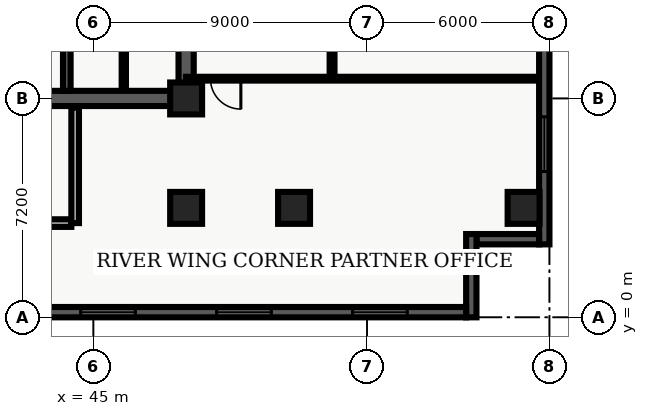
"""IFC4 building model, lengths in metres.
Left out: names, types, materials, properties, quantities, classifications, styles, units other than length and angle.
Written with IfcOpenShell. Run it as: python <this file> out.ifc"""

import sys

from ifc_helpers import new_model, entity, si_unit, converted_unit, direction, frame, origin_with_axes, origin_2d_with_axis, place, context, subcontext, project, spatial, polyline, rectangle, outline, extrude, element, fill, save


model = new_model("IFC4")
c1 = context("Model", 3, precision=1e-05, world=origin_with_axes(), true_north=direction((0.0, 1.0)))
c2 = subcontext(c1, "Body", "Model", "MODEL_VIEW")
j1 = project(units=[si_unit("LENGTHUNIT", "METRE"), converted_unit("PLANEANGLEUNIT", "DEGREE", entity("IfcPlaneAngleMeasure", 0.017), si_unit("PLANEANGLEUNIT", "RADIAN"), dimensions=[0, 0, 0, 0, 0, 0, 0])], contexts=[c1])
p1 = place(None, origin_with_axes())
s1 = spatial("IfcSite", under=j1, at=p1, CompositionType="ELEMENT")
p2 = place(p1, origin_with_axes())
s2 = spatial("IfcBuilding", under=s1, at=p2, CompositionType="ELEMENT")
p3 = place(p2, frame((0.0, 0.0, 140.7), z_axis=(0.0, 0.0, 1.0), x_axis=(1.0, 0.0, 0.0)))
s3 = spatial("IfcBuildingStorey", under=s2, at=p3, CompositionType="ELEMENT", Elevation=140.7)
p4 = place(p3, frame((40.2, 7.2, 0.0), z_axis=(0.0, 0.0, 1.0), x_axis=(1.0, 0.0, 0.0)))
e1 = element("IfcWall", 1, at=p4, inside=s3, PredefinedType="SHEAR", context=c2, shape_type="SweptSolid", body=[
    extrude(outline(polyline([(0.0, -0.25), (7.85, -0.25), (7.85, 0.25), (0.0, 0.25), (0.0, -0.25)])), origin_with_axes(), (0.0, 0.0, 1.0), 3.66),
])
p5 = place(p4, frame((2.175, 0.0, 0.0), z_axis=(0.0, 0.0, 1.0), x_axis=(1.0, 0.0, 0.0)))
e2 = element("IfcOpeningElement", 2, at=p5, cuts=e1, PredefinedType="OPENING", context=c2, shape_type="SweptSolid", body=[
    extrude(rectangle(XDim=1.05, YDim=0.52, at=origin_2d_with_axis()), origin_with_axes(), (0.0, 0.0, 1.0), 2.15),
])
p6 = place(p3, frame((48.05, 7.2, 0.0), z_axis=(0.0, 0.0, 1.0), x_axis=(0.0, 1.0, 0.0)))
e3 = element("IfcWall", 3, at=p6, inside=s3, PredefinedType="SHEAR", context=c2, shape_type="SweptSolid", body=[
    extrude(outline(polyline([(0.0, -0.25), (15.6, -0.25), (15.6, 0.25), (0.0, 0.25), (0.0, -0.25)])), origin_with_axes(), (0.0, 0.0, 1.0), 3.66),
])
p7 = place(p6, frame((5.975, 0.0, 0.0), z_axis=(0.0, 0.0, 1.0), x_axis=(1.0, 0.0, 0.0)))
e4 = element("IfcOpeningElement", 4, at=p7, cuts=e3, PredefinedType="OPENING", context=c2, shape_type="SweptSolid", body=[
    extrude(rectangle(XDim=1.05, YDim=0.52, at=origin_2d_with_axis()), origin_with_axes(), (0.0, 0.0, 1.0), 2.15),
])
p8 = place(p6, frame((2.725, 0.0, 0.0), z_axis=(0.0, 0.0, 1.0), x_axis=(1.0, 0.0, 0.0)))
e5 = element("IfcOpeningElement", 5, at=p8, cuts=e3, PredefinedType="OPENING", context=c2, shape_type="SweptSolid", body=[
    extrude(rectangle(XDim=0.95, YDim=0.52, at=origin_2d_with_axis()), origin_with_axes(), (0.0, 0.0, 1.0), 2.15),
])
p9 = place(p3, frame((44.125, 7.45, 0.0), z_axis=(0.0, 0.0, 1.0), x_axis=(0.0, 1.0, 0.0)))
e6 = element("IfcWall", 6, at=p9, inside=s3, PredefinedType="SHEAR", context=c2, shape_type="SweptSolid", body=[
    extrude(outline(polyline([(0.0, -0.125), (15.1, -0.125), (15.1, 0.125), (0.0, 0.125), (0.0, -0.125)])), origin_with_axes(), (0.0, 0.0, 1.0), 3.66),
])
p10 = place(p3, frame((40.325, 3.1, 0.0), z_axis=(0.0, 0.0, 1.0), x_axis=(1.0, 0.0, 0.0)))
e7 = element("IfcWall", 7, at=p10, inside=s3, PredefinedType="SOLIDWALL", context=c2, shape_type="SweptSolid", body=[
    extrude(outline(polyline([(0.0, -0.125), (3.95, -0.125), (3.95, 0.125), (0.0, 0.125), (0.0, -0.125)])), origin_with_axes(), (0.0, 0.0, 1.0), 2.7),
])
p11 = place(p3, frame((44.4, 3.1, 0.0), z_axis=(0.0, 0.0, 1.0), x_axis=(0.0, 1.0, 0.0)))
e8 = element("IfcWall", 8, at=p11, inside=s3, PredefinedType="SOLIDWALL", context=c2, shape_type="SweptSolid", body=[
    extrude(outline(polyline([(0.0, -0.125), (3.8, -0.125), (3.8, 0.125), (0.0, 0.125), (0.0, -0.125)])), origin_with_axes(), (0.0, 0.0, 1.0), 2.7),
])
for number, where, z_axis, x_axis in (
    (9, (48.05, 3.6, 0.0), (0.0, 0.0, 1.0), (1.0, 0.0, 0.0)),
    (10, (48.05, 7.2, 0.0), (0.0, 0.0, 1.0), (1.0, 0.0, 0.0)),
    (11, (51.6, 3.6, 0.0), (0.0, 0.0, 1.0), (1.0, 0.0, 0.0)),
    (12, (59.15, 3.6, 0.0), (0.0, 0.0, 1.0), (1.0, 0.0, 0.0)),
):
    element("IfcColumn", number, at=place(p3, frame(where, z_axis=z_axis, x_axis=x_axis)), inside=s3, PredefinedType="COLUMN", context=c2, shape_type="SweptSolid", body=[
        extrude(rectangle(XDim=1.05, YDim=1.05, at=origin_2d_with_axis()), origin_with_axes(), (0.0, 0.0, 1.0), 3.9),
    ])
p12 = place(p3, frame((46.0, 7.5, 0.0), z_axis=(0.0, 0.0, 1.0), x_axis=(0.0, 1.0, 0.0)))
e13 = element("IfcWall", 13, at=p12, inside=s3, PredefinedType="PARTITIONING", context=c2, shape_type="SweptSolid", body=[
    extrude(outline(polyline([(0.0, -0.07), (4.08, -0.07), (4.08, 0.07), (0.0, 0.07), (0.0, -0.07)])), origin_with_axes(), (0.0, 0.0, 1.0), 2.7),
])
p13 = place(p12, frame((2.0, 0.0, 0.0), z_axis=(0.0, 0.0, 1.0), x_axis=(1.0, 0.0, 0.0)))
e14 = element("IfcOpeningElement", 14, at=p13, cuts=e13, PredefinedType="OPENING", context=c2, shape_type="SweptSolid", body=[
    extrude(rectangle(XDim=0.9, YDim=0.16, at=origin_2d_with_axis()), origin_with_axes(), (0.0, 0.0, 1.0), 2.15),
])
p14 = place(p3, frame((52.85, 7.85, 0.0), z_axis=(0.0, 0.0, 1.0), x_axis=(0.0, 1.0, 0.0)))
e15 = element("IfcWall", 15, at=p14, inside=s3, PredefinedType="PARTITIONING", context=c2, shape_type="SweptSolid", body=[
    extrude(outline(polyline([(0.0, -0.08), (18.8, -0.08), (18.8, 0.08), (0.0, 0.08), (0.0, -0.08)])), origin_with_axes(), (0.0, 0.0, 1.0), 2.7),
])
p15 = place(p14, frame((4.133, 0.0, 0.0), z_axis=(0.0, 0.0, 1.0), x_axis=(1.0, 0.0, 0.0)))
e16 = element("IfcOpeningElement", 16, at=p15, cuts=e15, PredefinedType="OPENING", context=c2, shape_type="SweptSolid", body=[
    extrude(rectangle(XDim=1.0, YDim=0.18, at=origin_2d_with_axis()), origin_with_axes(), (0.0, 0.0, 1.0), 2.15),
])
p16 = place(p14, frame((13.473, 0.0, 0.0), z_axis=(0.0, 0.0, 1.0), x_axis=(1.0, 0.0, 0.0)))
e17 = element("IfcOpeningElement", 17, at=p16, cuts=e15, PredefinedType="OPENING", context=c2, shape_type="SweptSolid", body=[
    extrude(rectangle(XDim=1.0, YDim=0.18, at=origin_2d_with_axis()), origin_with_axes(), (0.0, 0.0, 1.0), 2.15),
])
p17 = place(p3, frame((59.665, 7.85, 0.0), z_axis=(0.0, 0.0, 1.0), x_axis=(-1.0, 0.0, 0.0)))
e18 = element("IfcWall", 18, at=p17, inside=s3, PredefinedType="PARTITIONING", context=c2, shape_type="SweptSolid", body=[
    extrude(outline(polyline([(0.0, -0.062), (11.615, -0.062), (11.615, 0.062), (0.0, 0.062), (0.0, -0.062)])), origin_with_axes(), (0.0, 0.0, 1.0), 2.7),
])
p18 = place(p17, frame((10.315, 0.0, 0.0), z_axis=(0.0, 0.0, 1.0), x_axis=(1.0, 0.0, 0.0)))
e19 = element("IfcOpeningElement", 19, at=p18, cuts=e18, PredefinedType="OPENING", context=c2, shape_type="SweptSolid", body=[
    extrude(rectangle(XDim=1.0, YDim=0.145, at=origin_2d_with_axis()), origin_with_axes(), (0.0, 0.0, 1.0), 2.15),
])
p19 = place(p3, frame((59.83, 26.06, 0.0), z_axis=(0.0, 0.0, 1.0), x_axis=(0.0, -1.0, 0.0)))
e20 = element("IfcWall", 20, at=p19, inside=s3, PredefinedType="SOLIDWALL", context=c2, shape_type="SweptSolid", body=[
    extrude(outline(polyline([(0.0, -0.17), (23.66, -0.17), (23.66, 0.17), (0.0, 0.17), (0.0, -0.17)])), origin_with_axes(), (0.0, 0.0, 1.0), 3.66),
])
p20 = place(p19, frame((3.696, 0.0, 0.45), z_axis=(0.0, 0.0, 1.0), x_axis=(1.0, 0.0, 0.0)))
e21 = element("IfcOpeningElement", 21, at=p20, cuts=e20, PredefinedType="OPENING", context=c2, shape_type="SweptSolid", body=[
    extrude(rectangle(XDim=1.8, YDim=0.36, at=origin_2d_with_axis()), origin_with_axes(), (0.0, 0.0, 1.0), 2.1),
])
p21 = place(p19, frame((11.83, 0.0, 0.45), z_axis=(0.0, 0.0, 1.0), x_axis=(1.0, 0.0, 0.0)))
e22 = element("IfcOpeningElement", 22, at=p21, cuts=e20, PredefinedType="OPENING", context=c2, shape_type="SweptSolid", body=[
    extrude(rectangle(XDim=1.8, YDim=0.36, at=origin_2d_with_axis()), origin_with_axes(), (0.0, 0.0, 1.0), 2.1),
])
p22 = place(p19, frame((20.364, 0.0, 0.45), z_axis=(0.0, 0.0, 1.0), x_axis=(1.0, 0.0, 0.0)))
e23 = element("IfcOpeningElement", 23, at=p22, cuts=e20, PredefinedType="OPENING", context=c2, shape_type="SweptSolid", body=[
    extrude(rectangle(XDim=1.8, YDim=0.36, at=origin_2d_with_axis()), origin_with_axes(), (0.0, 0.0, 1.0), 2.1),
])
p23 = place(p3, frame((59.66, 2.57, 0.0), z_axis=(0.0, 0.0, 1.0), x_axis=(-1.0, 0.0, 0.0)))
e24 = element("IfcWall", 24, at=p23, inside=s3, PredefinedType="SOLIDWALL", context=c2, shape_type="SweptSolid", body=[
    extrude(outline(polyline([(0.0, -0.17), (2.06, -0.17), (2.06, 0.17), (0.0, 0.17), (0.0, -0.17)])), origin_with_axes(), (0.0, 0.0, 1.0), 3.66),
])
p24 = place(p3, frame((57.43, 2.74, 0.0), z_axis=(0.0, 0.0, 1.0), x_axis=(0.0, -1.0, 0.0)))
e25 = element("IfcWall", 25, at=p24, inside=s3, PredefinedType="SOLIDWALL", context=c2, shape_type="SweptSolid", body=[
    extrude(outline(polyline([(0.0, -0.17), (2.74, -0.17), (2.74, 0.17), (0.0, 0.17), (0.0, -0.17)])), origin_with_axes(), (0.0, 0.0, 1.0), 3.66),
])
p25 = place(p3, frame((57.26, 0.17, 0.0), z_axis=(0.0, 0.0, 1.0), x_axis=(-1.0, 0.0, 0.0)))
e26 = element("IfcWall", 26, at=p25, inside=s3, PredefinedType="SOLIDWALL", context=c2, shape_type="SweptSolid", body=[
    extrude(outline(polyline([(0.0, -0.17), (54.86, -0.17), (54.86, 0.17), (0.0, 0.17), (0.0, -0.17)])), origin_with_axes(), (0.0, 0.0, 1.0), 3.66),
])
p26 = place(p25, frame((2.836, 0.0, 0.45), z_axis=(0.0, 0.0, 1.0), x_axis=(1.0, 0.0, 0.0)))
e27 = element("IfcOpeningElement", 27, at=p26, cuts=e26, PredefinedType="OPENING", context=c2, shape_type="SweptSolid", body=[
    extrude(rectangle(XDim=1.8, YDim=0.36, at=origin_2d_with_axis()), origin_with_axes(), (0.0, 0.0, 1.0), 2.1),
])
p27 = place(p25, frame((7.307, 0.0, 0.45), z_axis=(0.0, 0.0, 1.0), x_axis=(1.0, 0.0, 0.0)))
e28 = element("IfcOpeningElement", 28, at=p27, cuts=e26, PredefinedType="OPENING", context=c2, shape_type="SweptSolid", body=[
    extrude(rectangle(XDim=1.8, YDim=0.36, at=origin_2d_with_axis()), origin_with_axes(), (0.0, 0.0, 1.0), 2.1),
])
p28 = place(p25, frame((11.779, 0.0, 0.45), z_axis=(0.0, 0.0, 1.0), x_axis=(1.0, 0.0, 0.0)))
e29 = element("IfcOpeningElement", 29, at=p28, cuts=e26, PredefinedType="OPENING", context=c2, shape_type="SweptSolid", body=[
    extrude(rectangle(XDim=1.8, YDim=0.36, at=origin_2d_with_axis()), origin_with_axes(), (0.0, 0.0, 1.0), 2.1),
])
p29 = place(p25, frame((16.251, 0.0, 0.45), z_axis=(0.0, 0.0, 1.0), x_axis=(1.0, 0.0, 0.0)))
e30 = element("IfcOpeningElement", 30, at=p29, cuts=e26, PredefinedType="OPENING", context=c2, shape_type="SweptSolid", body=[
    extrude(rectangle(XDim=1.8, YDim=0.36, at=origin_2d_with_axis()), origin_with_axes(), (0.0, 0.0, 1.0), 2.1),
])
p30 = place(p25, frame((20.723, 0.0, 0.45), z_axis=(0.0, 0.0, 1.0), x_axis=(1.0, 0.0, 0.0)))
e31 = element("IfcOpeningElement", 31, at=p30, cuts=e26, PredefinedType="OPENING", context=c2, shape_type="SweptSolid", body=[
    extrude(rectangle(XDim=1.8, YDim=0.36, at=origin_2d_with_axis()), origin_with_axes(), (0.0, 0.0, 1.0), 2.1),
])
p31 = place(p25, frame((34.588, 0.0, 0.45), z_axis=(0.0, 0.0, 1.0), x_axis=(1.0, 0.0, 0.0)))
e32 = element("IfcOpeningElement", 32, at=p31, cuts=e26, PredefinedType="OPENING", context=c2, shape_type="SweptSolid", body=[
    extrude(rectangle(XDim=1.8, YDim=0.36, at=origin_2d_with_axis()), origin_with_axes(), (0.0, 0.0, 1.0), 2.1),
])
p32 = place(p25, frame((38.609, 0.0, 0.45), z_axis=(0.0, 0.0, 1.0), x_axis=(1.0, 0.0, 0.0)))
e33 = element("IfcOpeningElement", 33, at=p32, cuts=e26, PredefinedType="OPENING", context=c2, shape_type="SweptSolid", body=[
    extrude(rectangle(XDim=1.8, YDim=0.36, at=origin_2d_with_axis()), origin_with_axes(), (0.0, 0.0, 1.0), 2.1),
])
p33 = place(p25, frame((43.081, 0.0, 0.45), z_axis=(0.0, 0.0, 1.0), x_axis=(1.0, 0.0, 0.0)))
e34 = element("IfcOpeningElement", 34, at=p33, cuts=e26, PredefinedType="OPENING", context=c2, shape_type="SweptSolid", body=[
    extrude(rectangle(XDim=1.8, YDim=0.36, at=origin_2d_with_axis()), origin_with_axes(), (0.0, 0.0, 1.0), 2.1),
])
p34 = place(p25, frame((47.553, 0.0, 0.45), z_axis=(0.0, 0.0, 1.0), x_axis=(1.0, 0.0, 0.0)))
e35 = element("IfcOpeningElement", 35, at=p34, cuts=e26, PredefinedType="OPENING", context=c2, shape_type="SweptSolid", body=[
    extrude(rectangle(XDim=1.8, YDim=0.36, at=origin_2d_with_axis()), origin_with_axes(), (0.0, 0.0, 1.0), 2.1),
])
p35 = place(p25, frame((52.024, 0.0, 0.45), z_axis=(0.0, 0.0, 1.0), x_axis=(1.0, 0.0, 0.0)))
e36 = element("IfcOpeningElement", 36, at=p35, cuts=e26, PredefinedType="OPENING", context=c2, shape_type="SweptSolid", body=[
    extrude(rectangle(XDim=1.8, YDim=0.36, at=origin_2d_with_axis()), origin_with_axes(), (0.0, 0.0, 1.0), 2.1),
])
p36 = place(p17, frame((10.315, 0.0, 0.0), z_axis=(0.0, 0.0, 1.0), x_axis=(1.0, 0.0, 0.0)))
e37 = element("IfcDoor", 37, at=p36, inside=s3, OperationType="SINGLE_SWING_LEFT", PredefinedType="DOOR", context=c2, shape_type="SweptSolid", body=[
    extrude(rectangle(XDim=1.0, YDim=0.075, at=origin_2d_with_axis()), origin_with_axes(), (0.0, 0.0, 1.0), 2.15),
])
fill(e19, e37)
p37 = place(p19, frame((20.364, 0.0, 0.45), z_axis=(0.0, 0.0, 1.0), x_axis=(1.0, 0.0, 0.0)))
e38 = element("IfcWindow", 38, at=p37, inside=s3, PredefinedType="WINDOW", context=c2, shape_type="SweptSolid", body=[
    extrude(rectangle(XDim=1.8, YDim=0.09, at=origin_2d_with_axis()), origin_with_axes(), (0.0, 0.0, 1.0), 2.1),
])
fill(e23, e38)
p38 = place(p25, frame((2.836, 0.0, 0.45), z_axis=(0.0, 0.0, 1.0), x_axis=(1.0, 0.0, 0.0)))
e39 = element("IfcWindow", 39, at=p38, inside=s3, PredefinedType="WINDOW", context=c2, shape_type="SweptSolid", body=[
    extrude(rectangle(XDim=1.8, YDim=0.09, at=origin_2d_with_axis()), origin_with_axes(), (0.0, 0.0, 1.0), 2.1),
])
fill(e27, e39)
p39 = place(p25, frame((7.307, 0.0, 0.45), z_axis=(0.0, 0.0, 1.0), x_axis=(1.0, 0.0, 0.0)))
e40 = element("IfcWindow", 40, at=p39, inside=s3, PredefinedType="WINDOW", context=c2, shape_type="SweptSolid", body=[
    extrude(rectangle(XDim=1.8, YDim=0.09, at=origin_2d_with_axis()), origin_with_axes(), (0.0, 0.0, 1.0), 2.1),
])
fill(e28, e40)
p40 = place(p25, frame((11.779, 0.0, 0.45), z_axis=(0.0, 0.0, 1.0), x_axis=(1.0, 0.0, 0.0)))
e41 = element("IfcWindow", 41, at=p40, inside=s3, PredefinedType="WINDOW", context=c2, shape_type="SweptSolid", body=[
    extrude(rectangle(XDim=1.8, YDim=0.09, at=origin_2d_with_axis()), origin_with_axes(), (0.0, 0.0, 1.0), 2.1),
])
fill(e29, e41)
save(model, sys.argv[1])
